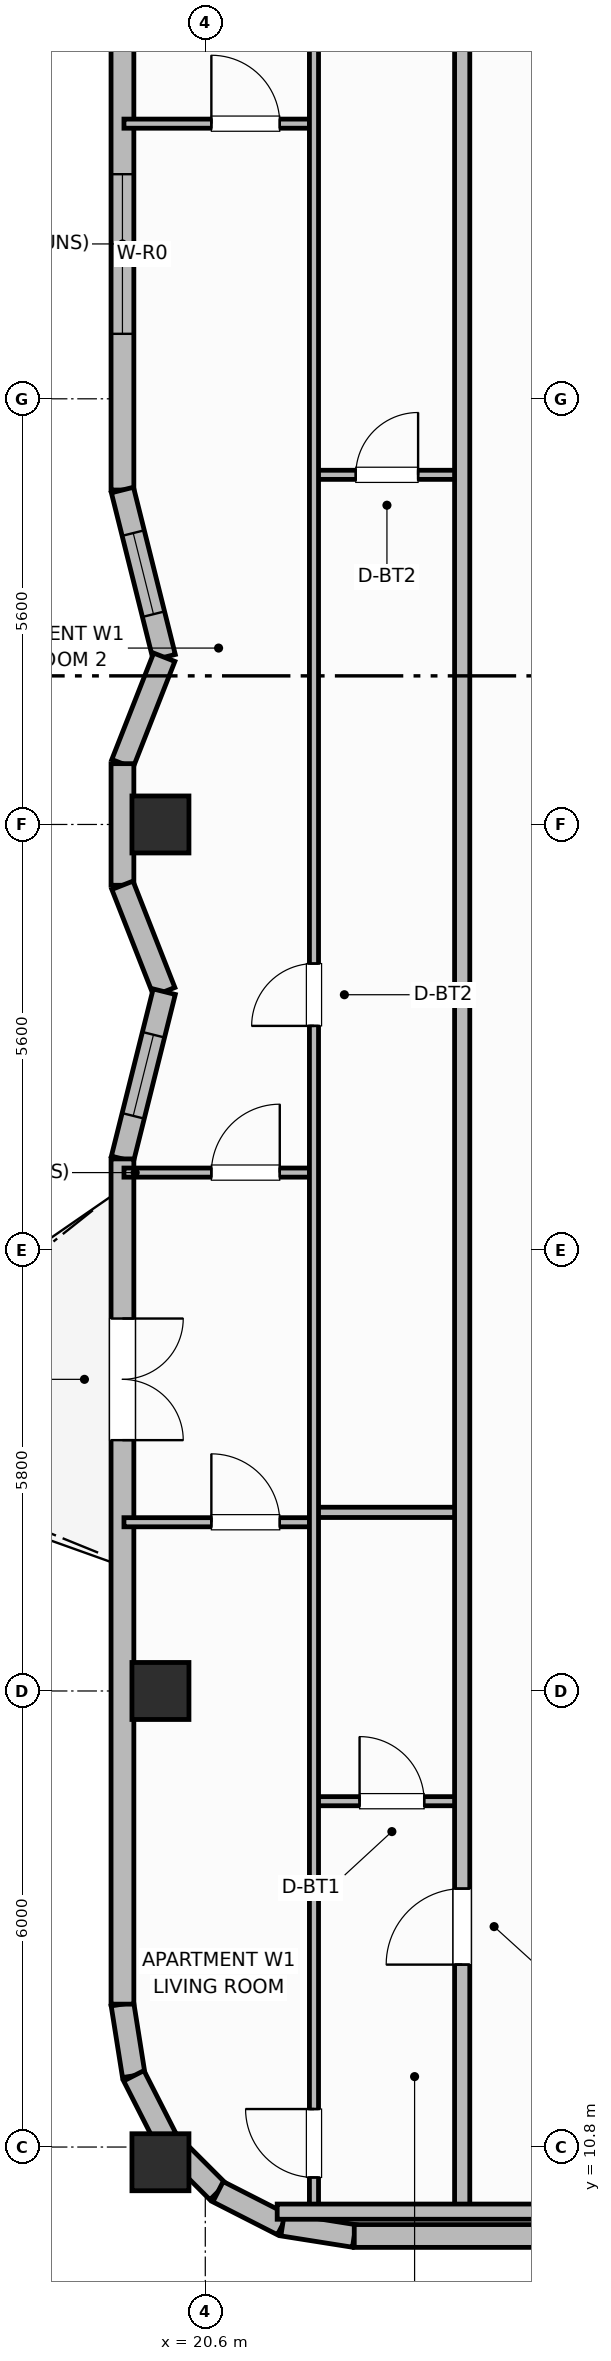
"""IFC4 building model, lengths in metres.
Left out: names, types, materials, properties, quantities, classifications, styles, units other than length and angle.
Written with IfcOpenShell. Run it as: python <this file> out.ifc"""

import sys

from ifc_helpers import new_model, si_unit, direction, frame, frame_2d, origin, origin_2d, place, context, subcontext, project, spatial, rectangle, extrude, element, fill, save


model = new_model("IFC4")
c1 = context("Model", 3, precision=1e-05, world=origin(), true_north=direction((0.0, 1.0)))
c2 = subcontext(c1, "Body", "Model", "MODEL_VIEW")
j1 = project(units=[si_unit("LENGTHUNIT", "METRE"), si_unit("PLANEANGLEUNIT", "RADIAN")], contexts=[c1])
p1 = place(None, origin())
s1 = spatial("IfcSite", under=j1, at=p1, CompositionType="ELEMENT")
p2 = place(p1, origin())
s2 = spatial("IfcBuilding", under=s1, at=p2, CompositionType="ELEMENT")
p3 = place(p2, frame((0.0, 0.0, 260.2)))
s3 = spatial("IfcBuildingStorey", under=s2, at=p3, CompositionType="ELEMENT", Elevation=260.2)
for number, where, z_axis, x_axis in (
    (1, (20.01, 10.6, 0.0), (0.0, 0.0, 1.0), (1.0, 0.0, 0.0)),
    (2, (20.01, 16.8, 0.0), (0.0, 0.0, 1.0), (1.0, 0.0, 0.0)),
    (3, (20.01, 28.2, 0.0), (0.0, 0.0, 1.0), (1.0, 0.0, 0.0)),
):
    element("IfcColumn", number, at=place(p3, frame(where, z_axis=z_axis, x_axis=x_axis)), inside=s3, PredefinedType="COLUMN", context=c2, shape_type="SweptSolid", body=[
        extrude(rectangle(XDim=0.75, YDim=0.75, at=origin_2d()), origin(), (0.0, 0.0, 1.0), 3.7),
    ])
p4 = place(p3, frame((19.51, 12.68, 0.0), z_axis=(0.0, 0.0, 1.0), x_axis=(0.156343617883, -0.987702725088, 0.0)))
e4 = element("IfcWall", 4, at=p4, inside=s3, PredefinedType="SOLIDWALL", context=c2, shape_type="SweptSolid", body=[
    extrude(rectangle(XDim=0.954, YDim=0.3, at=frame_2d((0.477, 0.0))), origin(), (0.0, 0.0, 1.0), 2.73),
])
for number, where, z_axis, x_axis in (
    (5, (19.659, 11.738, 0.0), (0.0, 0.0, 1.0), (0.454, -0.891, 0.0)),
    (6, (20.093, 10.887, 0.0), (0.0, 0.0, 1.0), (0.707, -0.707, 0.0)),
):
    element("IfcWall", number, at=place(p3, frame(where, z_axis=z_axis, x_axis=x_axis)), inside=s3, PredefinedType="SOLIDWALL", context=c2, shape_type="SweptSolid", body=[
        extrude(rectangle(XDim=0.954, YDim=0.3, at=frame_2d((0.477, 0.0))), origin(), (0.0, 0.0, 1.0), 2.73),
    ])
p5 = place(p3, frame((20.767, 10.212, 0.0), z_axis=(0.0, 0.0, 1.0), x_axis=(0.891023873617, -0.45395644796, 0.0)))
e7 = element("IfcWall", 7, at=p5, inside=s3, PredefinedType="SOLIDWALL", context=c2, shape_type="SweptSolid", body=[
    extrude(rectangle(XDim=0.954, YDim=0.3, at=frame_2d((0.477, 0.0))), origin(), (0.0, 0.0, 1.0), 2.73),
])
p6 = place(p3, frame((21.617, 9.779, 0.0), z_axis=(0.0, 0.0, 1.0), x_axis=(0.987669453596, -0.156553666304, 0.0)))
e8 = element("IfcWall", 8, at=p6, inside=s3, PredefinedType="SOLIDWALL", context=c2, shape_type="SweptSolid", body=[
    extrude(rectangle(XDim=0.954, YDim=0.3, at=frame_2d((0.477, 0.0))), origin(), (0.0, 0.0, 1.0), 2.73),
])
p7 = place(p3, frame((22.56, 9.63, 0.0), z_axis=(0.0, 0.0, 1.0), x_axis=(1.0, 0.0, 0.0)))
e9 = element("IfcWall", 9, at=p7, inside=s3, PredefinedType="SOLIDWALL", context=c2, shape_type="SweptSolid", body=[
    extrude(rectangle(XDim=33.28, YDim=0.3, at=frame_2d((16.64, 0.0))), origin(), (0.0, 0.0, 1.0), 2.73),
])
p8 = place(p7, frame((5.08, 0.0, 0.76)))
e10 = element("IfcOpeningElement", 10, at=p8, cuts=e9, PredefinedType="OPENING", context=c2, shape_type="SweptSolid", body=[
    extrude(rectangle(XDim=1.8, YDim=1.85, at=frame_2d((0.9, 0.925))), frame((0.0, 0.16, 0.0), z_axis=(0.0, -1.0, 0.0), x_axis=(1.0, 0.0, 0.0)), (0.0, 0.0, 1.0), 0.32),
])
p9 = place(p7, frame((8.633, 0.0, 0.76)))
e11 = element("IfcOpeningElement", 11, at=p9, cuts=e9, PredefinedType="OPENING", context=c2, shape_type="SweptSolid", body=[
    extrude(rectangle(XDim=1.8, YDim=1.85, at=frame_2d((0.9, 0.925))), frame((0.0, 0.16, 0.0), z_axis=(0.0, -1.0, 0.0), x_axis=(1.0, 0.0, 0.0)), (0.0, 0.0, 1.0), 0.32),
])
p10 = place(p7, frame((15.74, 0.0, 0.76)))
e12 = element("IfcOpeningElement", 12, at=p10, cuts=e9, PredefinedType="OPENING", context=c2, shape_type="SweptSolid", body=[
    extrude(rectangle(XDim=1.8, YDim=1.85, at=frame_2d((0.9, 0.925))), frame((0.0, 0.16, 0.0), z_axis=(0.0, -1.0, 0.0), x_axis=(1.0, 0.0, 0.0)), (0.0, 0.0, 1.0), 0.32),
])
p11 = place(p7, frame((22.847, 0.0, 0.76)))
e13 = element("IfcOpeningElement", 13, at=p11, cuts=e9, PredefinedType="OPENING", context=c2, shape_type="SweptSolid", body=[
    extrude(rectangle(XDim=1.8, YDim=1.85, at=frame_2d((0.9, 0.925))), frame((0.0, 0.16, 0.0), z_axis=(0.0, -1.0, 0.0), x_axis=(1.0, 0.0, 0.0)), (0.0, 0.0, 1.0), 0.32),
])
p12 = place(p7, frame((26.4, 0.0, 0.76)))
e14 = element("IfcOpeningElement", 14, at=p12, cuts=e9, PredefinedType="OPENING", context=c2, shape_type="SweptSolid", body=[
    extrude(rectangle(XDim=1.8, YDim=1.85, at=frame_2d((0.9, 0.925))), frame((0.0, 0.16, 0.0), z_axis=(0.0, -1.0, 0.0), x_axis=(1.0, 0.0, 0.0)), (0.0, 0.0, 1.0), 0.32),
])
p13 = place(p3, frame((19.51, 43.72, 0.0), z_axis=(0.0, 0.0, 1.0), x_axis=(0.0, -1.0, 0.0)))
e15 = element("IfcWall", 15, at=p13, inside=s3, PredefinedType="SOLIDWALL", context=c2, shape_type="SweptSolid", body=[
    extrude(rectangle(XDim=11.12, YDim=0.3, at=frame_2d((5.56, 0.0))), origin(), (0.0, 0.0, 1.0), 2.73),
])
p14 = place(p13, frame((1.08, 0.0, 0.72)))
e16 = element("IfcOpeningElement", 16, at=p14, cuts=e15, PredefinedType="OPENING", context=c2, shape_type="SweptSolid", body=[
    extrude(rectangle(XDim=1.4, YDim=1.85, at=frame_2d((0.7, 0.925))), frame((0.0, 0.16, 0.0), z_axis=(0.0, -1.0, 0.0), x_axis=(1.0, 0.0, 0.0)), (0.0, 0.0, 1.0), 0.32),
])
p15 = place(p13, frame((6.965, 0.0, 0.71)))
e17 = element("IfcOpeningElement", 17, at=p15, cuts=e15, PredefinedType="OPENING", context=c2, shape_type="SweptSolid", body=[
    extrude(rectangle(XDim=2.1, YDim=1.9, at=frame_2d((1.05, 0.95))), frame((0.0, 0.16, 0.0), z_axis=(0.0, -1.0, 0.0), x_axis=(1.0, 0.0, 0.0)), (0.0, 0.0, 1.0), 0.32),
])
p16 = place(p3, frame((19.51, 32.6, 0.0), z_axis=(0.0, 0.0, 1.0), x_axis=(0.242535625036, -0.970142500145, 0.0)))
e18 = element("IfcWall", 18, at=p16, inside=s3, PredefinedType="SOLIDWALL", context=c2, shape_type="SweptSolid", body=[
    extrude(rectangle(XDim=2.268, YDim=0.3, at=frame_2d((1.134, 0.0))), origin(), (0.0, 0.0, 1.0), 2.73),
])
p17 = place(p16, frame((0.584, 0.0, 0.92)))
e19 = element("IfcOpeningElement", 19, at=p17, cuts=e18, PredefinedType="OPENING", context=c2, shape_type="SweptSolid", body=[
    extrude(rectangle(XDim=1.1, YDim=1.65, at=frame_2d((0.55, 0.825))), frame((0.0, 0.16, 0.0), z_axis=(0.0, -1.0, 0.0), x_axis=(1.0, 0.0, 0.0)), (0.0, 0.0, 1.0), 0.32),
])
p18 = place(p3, frame((20.06, 30.4, 0.0), z_axis=(0.0, 0.0, 1.0), x_axis=(-0.365702591843, -0.930731762818, 0.0)))
e20 = element("IfcWall", 20, at=p18, inside=s3, PredefinedType="SOLIDWALL", context=c2, shape_type="SweptSolid", body=[
    extrude(rectangle(XDim=1.504, YDim=0.3, at=frame_2d((0.752, 0.0))), origin(), (0.0, 0.0, 1.0), 2.73),
])
p19 = place(p3, frame((19.51, 29.0, 0.0), z_axis=(0.0, 0.0, 1.0), x_axis=(0.0, -1.0, 0.0)))
e21 = element("IfcWall", 21, at=p19, inside=s3, PredefinedType="SOLIDWALL", context=c2, shape_type="SweptSolid", body=[
    extrude(rectangle(XDim=1.6, YDim=0.3, at=frame_2d((0.8, 0.0))), origin(), (0.0, 0.0, 1.0), 2.73),
])
p20 = place(p3, frame((19.51, 27.4, 0.0), z_axis=(0.0, 0.0, 1.0), x_axis=(0.365702591843, -0.930731762818, 0.0)))
e22 = element("IfcWall", 22, at=p20, inside=s3, PredefinedType="SOLIDWALL", context=c2, shape_type="SweptSolid", body=[
    extrude(rectangle(XDim=1.504, YDim=0.3, at=frame_2d((0.752, 0.0))), origin(), (0.0, 0.0, 1.0), 2.73),
])
p21 = place(p3, frame((20.06, 26.0, 0.0), z_axis=(0.0, 0.0, 1.0), x_axis=(-0.242560957029, -0.970136166796, 0.0)))
e23 = element("IfcWall", 23, at=p21, inside=s3, PredefinedType="SOLIDWALL", context=c2, shape_type="SweptSolid", body=[
    extrude(rectangle(XDim=2.268, YDim=0.3, at=frame_2d((1.134, 0.0))), origin(), (0.0, 0.0, 1.0), 2.73),
])
p22 = place(p21, frame((0.584, 0.0, 0.92)))
e24 = element("IfcOpeningElement", 24, at=p22, cuts=e23, PredefinedType="OPENING", context=c2, shape_type="SweptSolid", body=[
    extrude(rectangle(XDim=1.1, YDim=1.65, at=frame_2d((0.55, 0.825))), frame((0.0, 0.16, 0.0), z_axis=(0.0, -1.0, 0.0), x_axis=(1.0, 0.0, 0.0)), (0.0, 0.0, 1.0), 0.32),
])
p23 = place(p3, frame((19.51, 23.8, 0.0), z_axis=(0.0, 0.0, 1.0), x_axis=(0.0, -1.0, 0.0)))
e25 = element("IfcWall", 25, at=p23, inside=s3, PredefinedType="SOLIDWALL", context=c2, shape_type="SweptSolid", body=[
    extrude(rectangle(XDim=11.12, YDim=0.3, at=frame_2d((5.56, 0.0))), origin(), (0.0, 0.0, 1.0), 2.73),
])
p24 = place(p23, frame((2.1, 0.0, 0.0)))
e26 = element("IfcOpeningElement", 26, at=p24, cuts=e25, PredefinedType="OPENING", context=c2, shape_type="SweptSolid", body=[
    extrude(rectangle(XDim=1.6, YDim=2.1, at=frame_2d((0.8, 1.05))), frame((0.0, 0.16, 0.0), z_axis=(0.0, -1.0, 0.0), x_axis=(1.0, 0.0, 0.0)), (0.0, 0.0, 1.0), 0.32),
])
p25 = place(p3, frame((22.03, 15.35, 0.0), z_axis=(0.0, 0.0, 1.0), x_axis=(1.0, 0.0, 0.0)))
e27 = element("IfcWall", 27, at=p25, inside=s3, PredefinedType="PARTITIONING", context=c2, shape_type="SweptSolid", body=[
    extrude(rectangle(XDim=1.95, YDim=0.12, at=frame_2d((0.975, 0.0))), origin(), (0.0, 0.0, 1.0), 2.56),
])
p26 = place(p25, frame((0.6, 0.0, 0.0)))
e28 = element("IfcOpeningElement", 28, at=p26, cuts=e27, PredefinedType="OPENING", context=c2, shape_type="SweptSolid", body=[
    extrude(rectangle(XDim=0.85, YDim=2.1, at=frame_2d((0.425, 1.05))), frame((0.0, 0.07, 0.0), z_axis=(0.0, -1.0, 0.0), x_axis=(1.0, 0.0, 0.0)), (0.0, 0.0, 1.0), 0.14),
])
p27 = place(p3, frame((22.03, 19.15, 0.0), z_axis=(0.0, 0.0, 1.0), x_axis=(1.0, 0.0, 0.0)))
e29 = element("IfcWall", 29, at=p27, inside=s3, PredefinedType="PARTITIONING", context=c2, shape_type="SweptSolid", body=[
    extrude(rectangle(XDim=1.95, YDim=0.135, at=frame_2d((0.975, 0.0))), origin(), (0.0, 0.0, 1.0), 2.56),
])
p28 = place(p3, frame((22.03, 32.8, 0.0), z_axis=(0.0, 0.0, 1.0), x_axis=(1.0, 0.0, 0.0)))
e30 = element("IfcWall", 30, at=p28, inside=s3, PredefinedType="PARTITIONING", context=c2, shape_type="SweptSolid", body=[
    extrude(rectangle(XDim=1.95, YDim=0.12, at=frame_2d((0.975, 0.0))), origin(), (0.0, 0.0, 1.0), 2.56),
])
p29 = place(p28, frame((0.55, 0.0, 0.0)))
e31 = element("IfcOpeningElement", 31, at=p29, cuts=e30, PredefinedType="OPENING", context=c2, shape_type="SweptSolid", body=[
    extrude(rectangle(XDim=0.82, YDim=2.08, at=frame_2d((0.41, 1.04))), frame((0.0, 0.07, 0.0), z_axis=(0.0, -1.0, 0.0), x_axis=(1.0, 0.0, 0.0)), (0.0, 0.0, 1.0), 0.14),
])
p30 = place(p3, frame((19.53, 19.02, 0.0), z_axis=(0.0, 0.0, 1.0), x_axis=(1.0, 0.0, 0.0)))
e32 = element("IfcWall", 32, at=p30, inside=s3, PredefinedType="PARTITIONING", context=c2, shape_type="SweptSolid", body=[
    extrude(rectangle(XDim=2.5, YDim=0.12, at=frame_2d((1.25, 0.0))), origin(), (0.0, 0.0, 1.0), 2.56),
])
p31 = place(p30, frame((1.15, 0.0, 0.0)))
e33 = element("IfcOpeningElement", 33, at=p31, cuts=e32, PredefinedType="OPENING", context=c2, shape_type="SweptSolid", body=[
    extrude(rectangle(XDim=0.9, YDim=2.1, at=frame_2d((0.45, 1.05))), frame((0.0, 0.07, 0.0), z_axis=(0.0, -1.0, 0.0), x_axis=(1.0, 0.0, 0.0)), (0.0, 0.0, 1.0), 0.14),
])
p32 = place(p3, frame((19.53, 23.62, 0.0), z_axis=(0.0, 0.0, 1.0), x_axis=(1.0, 0.0, 0.0)))
e34 = element("IfcWall", 34, at=p32, inside=s3, PredefinedType="PARTITIONING", context=c2, shape_type="SweptSolid", body=[
    extrude(rectangle(XDim=2.5, YDim=0.12, at=frame_2d((1.25, 0.0))), origin(), (0.0, 0.0, 1.0), 2.56),
])
p33 = place(p32, frame((1.15, 0.0, 0.0)))
e35 = element("IfcOpeningElement", 35, at=p33, cuts=e34, PredefinedType="OPENING", context=c2, shape_type="SweptSolid", body=[
    extrude(rectangle(XDim=0.9, YDim=2.1, at=frame_2d((0.45, 1.05))), frame((0.0, 0.07, 0.0), z_axis=(0.0, -1.0, 0.0), x_axis=(1.0, 0.0, 0.0)), (0.0, 0.0, 1.0), 0.14),
])
p34 = place(p3, frame((19.53, 37.42, 0.0), z_axis=(0.0, 0.0, 1.0), x_axis=(1.0, 0.0, 0.0)))
e36 = element("IfcWall", 36, at=p34, inside=s3, PredefinedType="PARTITIONING", context=c2, shape_type="SweptSolid", body=[
    extrude(rectangle(XDim=2.5, YDim=0.12, at=frame_2d((1.25, 0.0))), origin(), (0.0, 0.0, 1.0), 2.56),
])
p35 = place(p34, frame((1.15, 0.0, 0.0)))
e37 = element("IfcOpeningElement", 37, at=p35, cuts=e36, PredefinedType="OPENING", context=c2, shape_type="SweptSolid", body=[
    extrude(rectangle(XDim=0.9, YDim=2.1, at=frame_2d((0.45, 1.05))), frame((0.0, 0.07, 0.0), z_axis=(0.0, -1.0, 0.0), x_axis=(1.0, 0.0, 0.0)), (0.0, 0.0, 1.0), 0.14),
])
p36 = place(p3, frame((22.03, 9.99, 0.0), z_axis=(0.0, 0.0, 1.0), x_axis=(0.0, 1.0, 0.0)))
e38 = element("IfcWall", 38, at=p36, inside=s3, PredefinedType="PARTITIONING", context=c2, shape_type="SweptSolid", body=[
    extrude(rectangle(XDim=36.42, YDim=0.12, at=frame_2d((18.21, 0.0))), origin(), (0.0, 0.0, 1.0), 2.56),
])
p37 = place(p36, frame((0.41, 0.0, 0.0)))
e39 = element("IfcOpeningElement", 39, at=p37, cuts=e38, PredefinedType="OPENING", context=c2, shape_type="SweptSolid", body=[
    extrude(rectangle(XDim=0.9, YDim=2.1, at=frame_2d((0.45, 1.05))), frame((0.0, 0.07, 0.0), z_axis=(0.0, -1.0, 0.0), x_axis=(1.0, 0.0, 0.0)), (0.0, 0.0, 1.0), 0.14),
])
p38 = place(p36, frame((15.56, 0.0, 0.0)))
e40 = element("IfcOpeningElement", 40, at=p38, cuts=e38, PredefinedType="OPENING", context=c2, shape_type="SweptSolid", body=[
    extrude(rectangle(XDim=0.82, YDim=2.08, at=frame_2d((0.41, 1.04))), frame((0.0, 0.07, 0.0), z_axis=(0.0, -1.0, 0.0), x_axis=(1.0, 0.0, 0.0)), (0.0, 0.0, 1.0), 0.14),
])
p39 = place(p3, frame((23.98, 9.95, 0.0), z_axis=(0.0, 0.0, 1.0), x_axis=(0.0, 1.0, 0.0)))
e41 = element("IfcWall", 41, at=p39, inside=s3, PredefinedType="PARTITIONING", context=c2, shape_type="SweptSolid", body=[
    extrude(rectangle(XDim=36.5, YDim=0.2, at=frame_2d((18.25, 0.0))), origin(), (0.0, 0.0, 1.0), 2.56),
])
p40 = place(p39, frame((3.25, 0.0, 0.0)))
e42 = element("IfcOpeningElement", 42, at=p40, cuts=e41, PredefinedType="OPENING", context=c2, shape_type="SweptSolid", body=[
    extrude(rectangle(XDim=1.0, YDim=2.15, at=frame_2d((0.5, 1.075))), frame((0.0, 0.11, 0.0), z_axis=(0.0, -1.0, 0.0), x_axis=(1.0, 0.0, 0.0)), (0.0, 0.0, 1.0), 0.22),
])
p41 = place(p3, frame((21.546, 9.95, 0.0), z_axis=(0.0, 0.0, 1.0), x_axis=(1.0, 0.0, 0.0)))
e43 = element("IfcWall", 43, at=p41, inside=s3, PredefinedType="PARTITIONING", context=c2, shape_type="SweptSolid", body=[
    extrude(rectangle(XDim=3.754, YDim=0.2, at=frame_2d((1.877, 0.0))), origin(), (0.0, 0.0, 1.0), 2.56),
])
p42 = place(p15, origin())
e44 = element("IfcWindow", 44, at=p42, inside=s3, PartitioningType="SINGLE_PANEL", PredefinedType="WINDOW", context=c2, shape_type="SweptSolid", body=[
    extrude(rectangle(XDim=2.1, YDim=1.9, at=frame_2d((1.05, 0.95))), frame((0.0, 0.03, 0.0), z_axis=(0.0, -1.0, 0.0), x_axis=(1.0, 0.0, 0.0)), (0.0, 0.0, 1.0), 0.06),
])
fill(e17, e44)
p43 = place(p17, origin())
e45 = element("IfcWindow", 45, at=p43, inside=s3, PartitioningType="SINGLE_PANEL", PredefinedType="WINDOW", context=c2, shape_type="SweptSolid", body=[
    extrude(rectangle(XDim=1.1, YDim=1.65, at=frame_2d((0.55, 0.825))), frame((0.0, 0.03, 0.0), z_axis=(0.0, -1.0, 0.0), x_axis=(1.0, 0.0, 0.0)), (0.0, 0.0, 1.0), 0.06),
])
fill(e19, e45)
p44 = place(p22, origin())
e46 = element("IfcWindow", 46, at=p44, inside=s3, PartitioningType="SINGLE_PANEL", PredefinedType="WINDOW", context=c2, shape_type="SweptSolid", body=[
    extrude(rectangle(XDim=1.1, YDim=1.65, at=frame_2d((0.55, 0.825))), frame((0.0, 0.03, 0.0), z_axis=(0.0, -1.0, 0.0), x_axis=(1.0, 0.0, 0.0)), (0.0, 0.0, 1.0), 0.06),
])
fill(e24, e46)
p45 = place(p24, origin())
e47 = element("IfcDoor", 47, at=p45, inside=s3, OperationType="DOUBLE_DOOR_SINGLE_SWING", PredefinedType="DOOR", context=c2, shape_type="SweptSolid", body=[
    extrude(rectangle(XDim=1.6, YDim=2.1, at=frame_2d((0.8, 1.05))), frame((0.0, 0.025, 0.0), z_axis=(0.0, -1.0, 0.0), x_axis=(1.0, 0.0, 0.0)), (0.0, 0.0, 1.0), 0.05),
])
fill(e26, e47)
p46 = place(p26, origin())
e48 = element("IfcDoor", 48, at=p46, inside=s3, OperationType="SINGLE_SWING_LEFT", PredefinedType="DOOR", context=c2, shape_type="SweptSolid", body=[
    extrude(rectangle(XDim=0.85, YDim=2.1, at=frame_2d((0.425, 1.05))), frame((0.0, 0.025, 0.0), z_axis=(0.0, -1.0, 0.0), x_axis=(1.0, 0.0, 0.0)), (0.0, 0.0, 1.0), 0.05),
])
fill(e28, e48)
p47 = place(p29, origin())
e49 = element("IfcDoor", 49, at=p47, inside=s3, OperationType="SINGLE_SWING_RIGHT", PredefinedType="DOOR", context=c2, shape_type="SweptSolid", body=[
    extrude(rectangle(XDim=0.82, YDim=2.08, at=frame_2d((0.41, 1.04))), frame((0.0, 0.025, 0.0), z_axis=(0.0, -1.0, 0.0), x_axis=(1.0, 0.0, 0.0)), (0.0, 0.0, 1.0), 0.05),
])
fill(e31, e49)
p48 = place(p31, origin())
e50 = element("IfcDoor", 50, at=p48, inside=s3, OperationType="SINGLE_SWING_LEFT", PredefinedType="DOOR", context=c2, shape_type="SweptSolid", body=[
    extrude(rectangle(XDim=0.9, YDim=2.1, at=frame_2d((0.45, 1.05))), frame((0.0, 0.025, 0.0), z_axis=(0.0, -1.0, 0.0), x_axis=(1.0, 0.0, 0.0)), (0.0, 0.0, 1.0), 0.05),
])
fill(e33, e50)
p49 = place(p33, origin())
e51 = element("IfcDoor", 51, at=p49, inside=s3, OperationType="SINGLE_SWING_RIGHT", PredefinedType="DOOR", context=c2, shape_type="SweptSolid", body=[
    extrude(rectangle(XDim=0.9, YDim=2.1, at=frame_2d((0.45, 1.05))), frame((0.0, 0.025, 0.0), z_axis=(0.0, -1.0, 0.0), x_axis=(1.0, 0.0, 0.0)), (0.0, 0.0, 1.0), 0.05),
])
fill(e35, e51)
p50 = place(p35, origin())
e52 = element("IfcDoor", 52, at=p50, inside=s3, OperationType="SINGLE_SWING_LEFT", PredefinedType="DOOR", context=c2, shape_type="SweptSolid", body=[
    extrude(rectangle(XDim=0.9, YDim=2.1, at=frame_2d((0.45, 1.05))), frame((0.0, 0.025, 0.0), z_axis=(0.0, -1.0, 0.0), x_axis=(1.0, 0.0, 0.0)), (0.0, 0.0, 1.0), 0.05),
])
fill(e37, e52)
p51 = place(p37, origin())
e53 = element("IfcDoor", 53, at=p51, inside=s3, OperationType="SINGLE_SWING_RIGHT", PredefinedType="DOOR", context=c2, shape_type="SweptSolid", body=[
    extrude(rectangle(XDim=0.9, YDim=2.1, at=frame_2d((0.45, 1.05))), frame((0.0, 0.025, 0.0), z_axis=(0.0, -1.0, 0.0), x_axis=(1.0, 0.0, 0.0)), (0.0, 0.0, 1.0), 0.05),
])
fill(e39, e53)
p52 = place(p38, origin())
e54 = element("IfcDoor", 54, at=p52, inside=s3, OperationType="SINGLE_SWING_LEFT", PredefinedType="DOOR", context=c2, shape_type="SweptSolid", body=[
    extrude(rectangle(XDim=0.82, YDim=2.08, at=frame_2d((0.41, 1.04))), frame((0.0, 0.025, 0.0), z_axis=(0.0, -1.0, 0.0), x_axis=(1.0, 0.0, 0.0)), (0.0, 0.0, 1.0), 0.05),
])
fill(e40, e54)
p53 = place(p40, origin())
e55 = element("IfcDoor", 55, at=p53, inside=s3, OperationType="SINGLE_SWING_LEFT", PredefinedType="DOOR", context=c2, shape_type="SweptSolid", body=[
    extrude(rectangle(XDim=1.0, YDim=2.15, at=frame_2d((0.5, 1.075))), frame((0.0, 0.025, 0.0), z_axis=(0.0, -1.0, 0.0), x_axis=(1.0, 0.0, 0.0)), (0.0, 0.0, 1.0), 0.05),
])
fill(e42, e55)
save(model, sys.argv[1])
